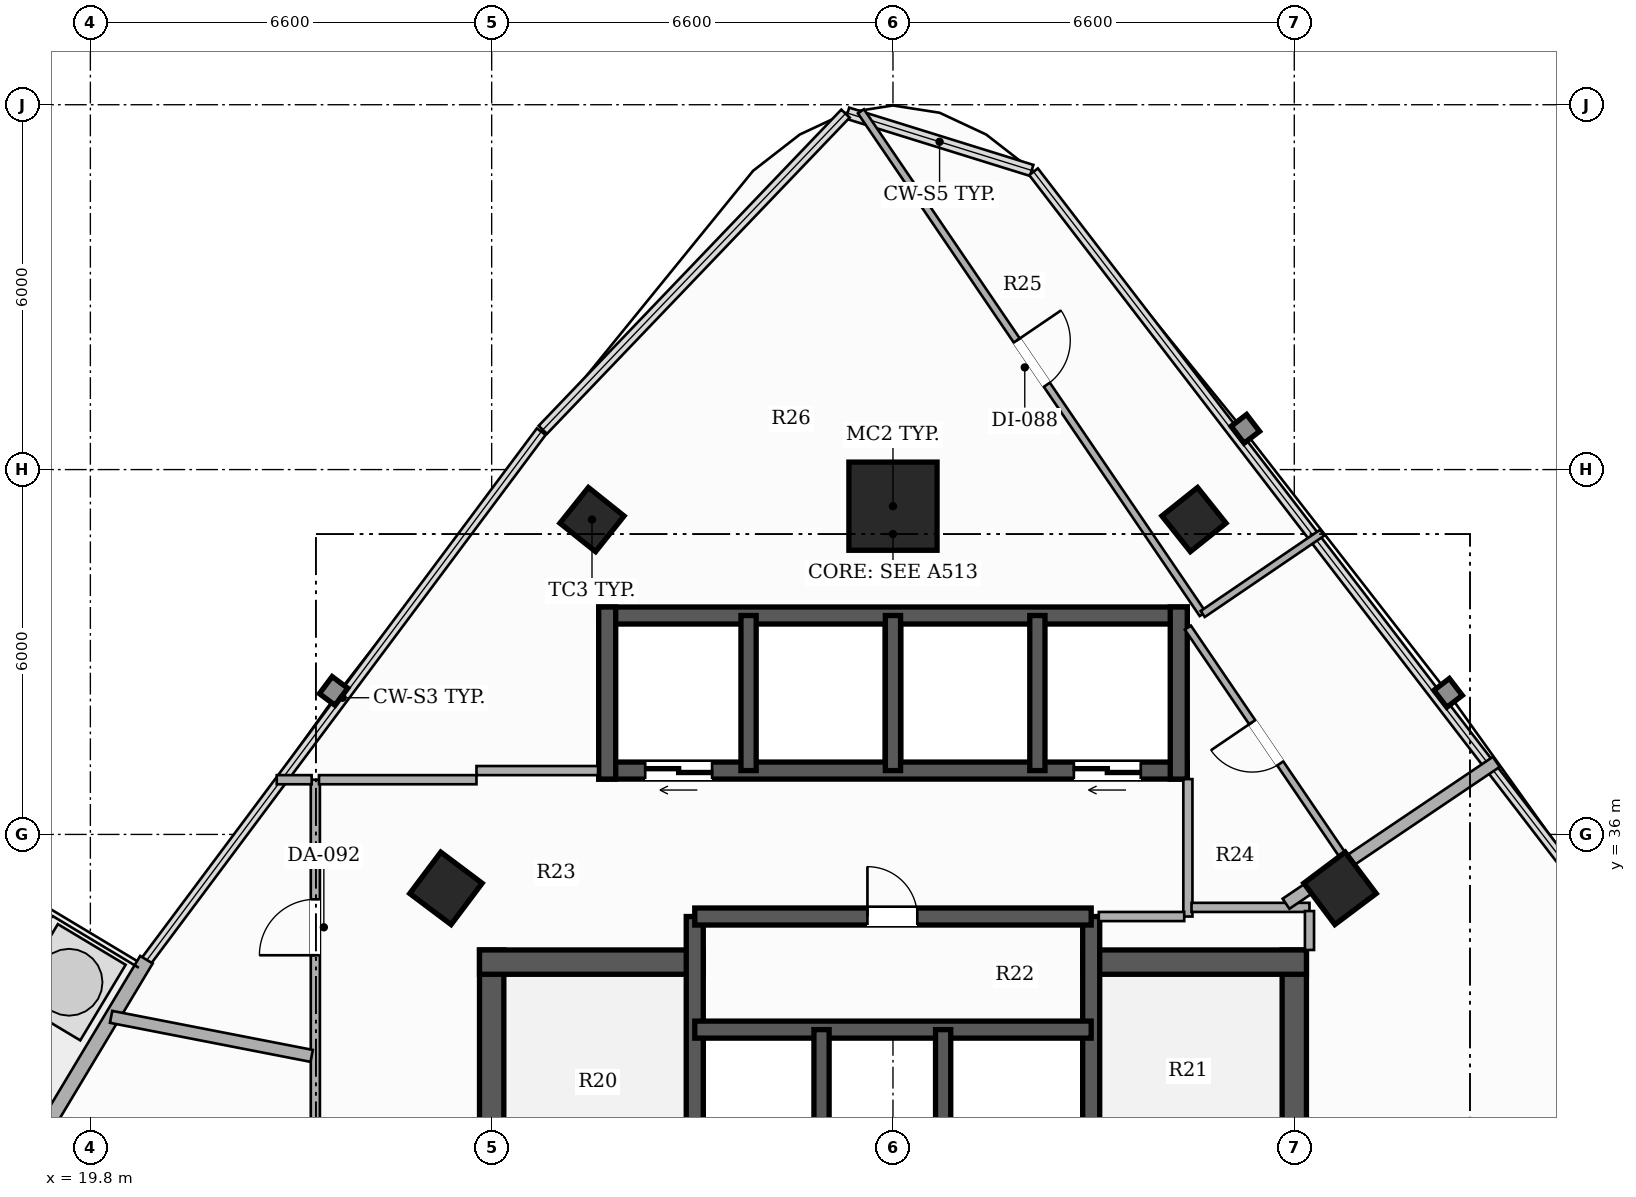
"""IFC4 building model, lengths in metres.
Left out: names, types, materials, properties, quantities, classifications, styles, units other than length and angle.
Written with IfcOpenShell. Run it as: python <this file> out.ifc"""

import sys

from ifc_helpers import new_model, si_unit, direction, frame, frame_2d, origin, origin_2d, place, context, subcontext, project, spatial, rectangle, hollow_rectangle, extrude, element, fill, save


model = new_model("IFC4")
c1 = context("Model", 3, precision=1e-05, world=origin(), true_north=direction((0.0, 1.0)))
c2 = subcontext(c1, "Body", "Model", "MODEL_VIEW")
j1 = project(units=[si_unit("LENGTHUNIT", "METRE"), si_unit("PLANEANGLEUNIT", "RADIAN")], contexts=[c1])
p1 = place(None, origin())
s1 = spatial("IfcSite", under=j1, at=p1, CompositionType="ELEMENT")
p2 = place(p1, origin())
s2 = spatial("IfcBuilding", under=s1, at=p2, CompositionType="ELEMENT")
p3 = place(p2, frame((0.0, 0.0, 167.15)))
s3 = spatial("IfcBuildingStorey", under=s2, at=p3, CompositionType="ELEMENT", Elevation=167.15)
p4 = place(p3, frame((26.4, 26.5, 0.0), z_axis=(0.0, 0.0, 1.0), x_axis=(0.0, 1.0, 0.0)))
e1 = element("IfcWall", 1, at=p4, inside=s3, PredefinedType="SHEAR", context=c2, shape_type="SweptSolid", body=[
    extrude(rectangle(XDim=7.6, YDim=0.4, at=frame_2d((3.8, 0.0))), origin(), (0.0, 0.0, 1.0), 3.3),
])
p5 = place(p3, frame((26.2, 33.9, 0.0), z_axis=(0.0, 0.0, 1.0), x_axis=(1.0, 0.0, 0.0)))
e2 = element("IfcWall", 2, at=p5, inside=s3, PredefinedType="SHEAR", context=c2, shape_type="SweptSolid", body=[
    extrude(rectangle(XDim=3.68, YDim=0.4, at=frame_2d((1.84, 0.0))), origin(), (0.0, 0.0, 1.0), 3.3),
])
p6 = place(p3, frame((39.6, 26.5, 0.0), z_axis=(0.0, 0.0, 1.0), x_axis=(0.0, 1.0, 0.0)))
e3 = element("IfcWall", 3, at=p6, inside=s3, PredefinedType="SHEAR", context=c2, shape_type="SweptSolid", body=[
    extrude(rectangle(XDim=7.6, YDim=0.4, at=frame_2d((3.8, 0.0))), origin(), (0.0, 0.0, 1.0), 3.3),
])
p7 = place(p3, frame((36.12, 33.9, 0.0), z_axis=(0.0, 0.0, 1.0), x_axis=(1.0, 0.0, 0.0)))
e4 = element("IfcWall", 4, at=p7, inside=s3, PredefinedType="SHEAR", context=c2, shape_type="SweptSolid", body=[
    extrude(rectangle(XDim=3.68, YDim=0.4, at=frame_2d((1.84, 0.0))), origin(), (0.0, 0.0, 1.0), 3.3),
])
p8 = place(p3, frame((29.74, 26.5, 0.0), z_axis=(0.0, 0.0, 1.0), x_axis=(0.0, 1.0, 0.0)))
e5 = element("IfcWall", 5, at=p8, inside=s3, PredefinedType="SHEAR", context=c2, shape_type="SweptSolid", body=[
    extrude(rectangle(XDim=8.15, YDim=0.28, at=frame_2d((4.075, 0.0))), origin(), (0.0, 0.0, 1.0), 3.3),
])
p9 = place(p8, frame((0.6, 0.0, 0.0)))
e6 = element("IfcOpeningElement", 6, at=p9, cuts=e5, PredefinedType="OPENING", context=c2, shape_type="SweptSolid", body=[
    extrude(rectangle(XDim=1.05, YDim=2.15, at=frame_2d((0.525, 1.075))), frame((0.0, 0.15, 0.0), z_axis=(0.0, -1.0, 0.0), x_axis=(1.0, 0.0, 0.0)), (0.0, 0.0, 1.0), 0.3),
])
p10 = place(p3, frame((36.26, 26.5, 0.0), z_axis=(0.0, 0.0, 1.0), x_axis=(0.0, 1.0, 0.0)))
e7 = element("IfcWall", 7, at=p10, inside=s3, PredefinedType="SHEAR", context=c2, shape_type="SweptSolid", body=[
    extrude(rectangle(XDim=8.15, YDim=0.28, at=frame_2d((4.075, 0.0))), origin(), (0.0, 0.0, 1.0), 3.3),
])
p11 = place(p10, frame((0.6, 0.0, 0.0)))
e8 = element("IfcOpeningElement", 8, at=p11, cuts=e7, PredefinedType="OPENING", context=c2, shape_type="SweptSolid", body=[
    extrude(rectangle(XDim=1.05, YDim=2.15, at=frame_2d((0.525, 1.075))), frame((0.0, 0.15, 0.0), z_axis=(0.0, -1.0, 0.0), x_axis=(1.0, 0.0, 0.0)), (0.0, 0.0, 1.0), 0.3),
])
p12 = place(p3, frame((29.74, 32.79, 0.0), z_axis=(0.0, 0.0, 1.0), x_axis=(1.0, 0.0, 0.0)))
e9 = element("IfcWall", 9, at=p12, inside=s3, PredefinedType="SHEAR", context=c2, shape_type="SweptSolid", body=[
    extrude(rectangle(XDim=6.52, YDim=0.28, at=frame_2d((3.26, 0.0))), origin(), (0.0, 0.0, 1.0), 3.3),
])
for number, where, z_axis, x_axis in (
    (10, (31.825, 29.89, 0.0), (0.0, 0.0, 1.0), (0.0, 1.0, 0.0)),
    (11, (33.825, 29.89, 0.0), (0.0, 0.0, 1.0), (0.0, 1.0, 0.0)),
):
    element("IfcWall", number, at=place(p3, frame(where, z_axis=z_axis, x_axis=x_axis)), inside=s3, PredefinedType="SHEAR", context=c2, shape_type="SweptSolid", body=[
        extrude(rectangle(XDim=2.9, YDim=0.25, at=frame_2d((1.45, 0.0))), origin(), (0.0, 0.0, 1.0), 3.3),
    ])
p13 = place(p3, frame((29.74, 34.65, 0.0), z_axis=(0.0, 0.0, 1.0), x_axis=(1.0, 0.0, 0.0)))
e12 = element("IfcWall", 12, at=p13, inside=s3, PredefinedType="SHEAR", context=c2, shape_type="SweptSolid", body=[
    extrude(rectangle(XDim=6.52, YDim=0.28, at=frame_2d((3.26, 0.0))), origin(), (0.0, 0.0, 1.0), 3.3),
])
p14 = place(p13, frame((2.84, 0.0, 0.0)))
e13 = element("IfcOpeningElement", 13, at=p14, cuts=e12, PredefinedType="OPENING", context=c2, shape_type="SweptSolid", body=[
    extrude(rectangle(XDim=0.82, YDim=2.1, at=frame_2d((0.41, 1.05))), frame((0.0, 0.15, 0.0), z_axis=(0.0, -1.0, 0.0), x_axis=(1.0, 0.0, 0.0)), (0.0, 0.0, 1.0), 0.3),
])
p15 = place(p3, frame((37.84, 37.05, 0.0), z_axis=(0.0, 0.0, 1.0), x_axis=(-1.0, 0.0, 0.0)))
e14 = element("IfcWall", 14, at=p15, inside=s3, PredefinedType="SHEAR", context=c2, shape_type="SweptSolid", body=[
    extrude(rectangle(XDim=9.68, YDim=0.28, at=frame_2d((4.84, 0.0))), origin(), (0.0, 0.0, 1.0), 3.3),
])
p16 = place(p15, frame((7.815, 0.0, 0.0)))
e15 = element("IfcOpeningElement", 15, at=p16, cuts=e14, PredefinedType="OPENING", context=c2, shape_type="SweptSolid", body=[
    extrude(rectangle(XDim=1.1, YDim=2.2, at=frame_2d((0.55, 1.1))), frame((0.0, 0.15, 0.0), z_axis=(0.0, -1.0, 0.0), x_axis=(1.0, 0.0, 0.0)), (0.0, 0.0, 1.0), 0.3),
])
p17 = place(p15, frame((0.765, 0.0, 0.0)))
e16 = element("IfcOpeningElement", 16, at=p17, cuts=e14, PredefinedType="OPENING", context=c2, shape_type="SweptSolid", body=[
    extrude(rectangle(XDim=1.1, YDim=2.2, at=frame_2d((0.55, 1.1))), frame((0.0, 0.15, 0.0), z_axis=(0.0, -1.0, 0.0), x_axis=(1.0, 0.0, 0.0)), (0.0, 0.0, 1.0), 0.3),
])
p18 = place(p3, frame((28.16, 39.6, 0.0), z_axis=(0.0, 0.0, 1.0), x_axis=(1.0, 0.0, 0.0)))
e17 = element("IfcWall", 17, at=p18, inside=s3, PredefinedType="SHEAR", context=c2, shape_type="SweptSolid", body=[
    extrude(rectangle(XDim=9.68, YDim=0.28, at=frame_2d((4.84, 0.0))), origin(), (0.0, 0.0, 1.0), 3.3),
])
for number, where, z_axis, x_axis in (
    (18, (28.3, 36.91, 0.0), (0.0, 0.0, 1.0), (0.0, 1.0, 0.0)),
    (19, (37.7, 36.91, 0.0), (0.0, 0.0, 1.0), (0.0, 1.0, 0.0)),
):
    element("IfcWall", number, at=place(p3, frame(where, z_axis=z_axis, x_axis=x_axis)), inside=s3, PredefinedType="SHEAR", context=c2, shape_type="SweptSolid", body=[
        extrude(rectangle(XDim=2.83, YDim=0.28, at=frame_2d((1.415, 0.0))), origin(), (0.0, 0.0, 1.0), 3.3),
    ])
for number, where, z_axis, x_axis in (
    (20, (30.625, 37.05, 0.0), (0.0, 0.0, 1.0), (0.0, 1.0, 0.0)),
    (21, (33.0, 37.05, 0.0), (0.0, 0.0, 1.0), (0.0, 1.0, 0.0)),
    (22, (35.375, 37.05, 0.0), (0.0, 0.0, 1.0), (0.0, 1.0, 0.0)),
):
    element("IfcWall", number, at=place(p3, frame(where, z_axis=z_axis, x_axis=x_axis)), inside=s3, PredefinedType="SHEAR", context=c2, shape_type="SweptSolid", body=[
        extrude(rectangle(XDim=2.55, YDim=0.25, at=frame_2d((1.275, 0.0))), origin(), (0.0, 0.0, 1.0), 3.3),
    ])
p19 = place(p3, frame((33.0, 41.398, 0.0), z_axis=(0.0, 0.0, 1.0), x_axis=(1.0, 0.0, 0.0)))
e23 = element("IfcColumn", 23, at=p19, inside=s3, PredefinedType="COLUMN", context=c2, shape_type="SweptSolid", body=[
    extrude(hollow_rectangle(XDim=1.45, YDim=1.45, WallThickness=0.045, at=origin_2d()), origin(), (0.0, 0.0, 1.0), 3.3),
])
for number, where, z_axis, x_axis in (
    (24, (25.648, 35.113, 0.0), (0.0, 0.0, 1.0), (0.6, 0.8, 0.0)),
    (25, (40.352, 35.113, 0.0), (0.0, 0.0, 1.0), (-0.6, 0.8, 0.0)),
):
    element("IfcColumn", number, at=place(p3, frame(where, z_axis=z_axis, x_axis=x_axis)), inside=s3, PredefinedType="COLUMN", context=c2, shape_type="SweptSolid", body=[
        extrude(hollow_rectangle(XDim=0.85, YDim=0.85, WallThickness=0.028, at=origin_2d()), origin(), (0.0, 0.0, 1.0), 3.3),
    ])
for number, where, z_axis, x_axis in (
    (26, (28.05, 41.178, 0.0), (0.0, 0.0, 1.0), (0.624, 0.782, 0.0)),
    (27, (37.95, 41.178, 0.0), (0.0, 0.0, 1.0), (-0.624, 0.782, 0.0)),
):
    element("IfcColumn", number, at=place(p3, frame(where, z_axis=z_axis, x_axis=x_axis)), inside=s3, PredefinedType="COLUMN", context=c2, shape_type="SweptSolid", body=[
        extrude(hollow_rectangle(XDim=0.75, YDim=0.75, WallThickness=0.025, at=origin_2d()), origin(), (0.0, 0.0, 1.0), 3.3),
    ])
p20 = place(p3, frame((20.722, 33.94, 0.0), z_axis=(0.0, 0.0, 1.0), x_axis=(-0.514334017412, -0.85758994778, 0.0)))
e28 = element("IfcWall", 28, at=p20, inside=s3, PredefinedType="SOLIDWALL", context=c2, shape_type="SweptSolid", body=[
    extrude(rectangle(XDim=11.1, YDim=0.24, at=frame_2d((5.55, 0.0))), origin(), (0.0, 0.0, 1.0), 2.624),
])
p21 = place(p20, frame((8.602, 0.0, 0.0)))
e29 = element("IfcOpeningElement", 29, at=p21, cuts=e28, PredefinedType="OPENING", context=c2, shape_type="SweptSolid", body=[
    extrude(rectangle(XDim=1.8, YDim=2.2, at=frame_2d((0.9, 1.1))), frame((0.0, 0.13, 0.0), z_axis=(0.0, -1.0, 0.0), x_axis=(1.0, 0.0, 0.0)), (0.0, 0.0, 1.0), 0.26),
])
p22 = place(p3, frame((37.85, 34.65, 0.0), z_axis=(0.0, 0.0, 1.0), x_axis=(0.0, 1.0, 0.0)))
e30 = element("IfcWall", 30, at=p22, inside=s3, PredefinedType="PARTITIONING", context=c2, shape_type="SweptSolid", body=[
    extrude(rectangle(XDim=2.26, YDim=0.15, at=frame_2d((1.13, 0.0))), origin(), (0.0, 0.0, 1.0), 3.06),
])
p23 = place(p3, frame((36.385, 34.65, 0.0), z_axis=(0.0, 0.0, 1.0), x_axis=(1.0, 0.0, 0.0)))
e31 = element("IfcWall", 31, at=p23, inside=s3, PredefinedType="PARTITIONING", context=c2, shape_type="SweptSolid", body=[
    extrude(rectangle(XDim=1.405, YDim=0.15, at=frame_2d((0.703, 0.0))), origin(), (0.0, 0.0, 1.0), 2.425),
])
p24 = place(p3, frame((23.5, 14.06, 0.0), z_axis=(0.0, 0.0, 1.0), x_axis=(0.0, 1.0, 0.0)))
e32 = element("IfcWall", 32, at=p24, inside=s3, PredefinedType="PARTITIONING", context=c2, shape_type="SweptSolid", body=[
    extrude(rectangle(XDim=22.84, YDim=0.15, at=frame_2d((11.42, 0.0))), origin(), (0.0, 0.0, 1.0), 2.413),
])
p25 = place(p24, frame((4.064, 0.0, 0.0)))
e33 = element("IfcOpeningElement", 33, at=p25, cuts=e32, PredefinedType="OPENING", context=c2, shape_type="SweptSolid", body=[
    extrude(rectangle(XDim=0.92, YDim=2.15, at=frame_2d((0.46, 1.075))), frame((0.0, 0.085, 0.0), z_axis=(0.0, -1.0, 0.0), x_axis=(1.0, 0.0, 0.0)), (0.0, 0.0, 1.0), 0.17),
])
p26 = place(p24, frame((13.047, 0.0, 0.0)))
e34 = element("IfcOpeningElement", 34, at=p26, cuts=e32, PredefinedType="OPENING", context=c2, shape_type="SweptSolid", body=[
    extrude(rectangle(XDim=0.88, YDim=2.1, at=frame_2d((0.44, 1.05))), frame((0.0, 0.085, 0.0), z_axis=(0.0, -1.0, 0.0), x_axis=(1.0, 0.0, 0.0)), (0.0, 0.0, 1.0), 0.17),
])
p27 = place(p24, frame((19.953, 0.0, 0.0)))
e35 = element("IfcOpeningElement", 35, at=p27, cuts=e32, PredefinedType="OPENING", context=c2, shape_type="SweptSolid", body=[
    extrude(rectangle(XDim=0.92, YDim=2.15, at=frame_2d((0.46, 1.075))), frame((0.0, 0.085, 0.0), z_axis=(0.0, -1.0, 0.0), x_axis=(1.0, 0.0, 0.0)), (0.0, 0.0, 1.0), 0.17),
])
p28 = place(p3, frame((22.865, 36.9, 0.0), z_axis=(0.0, 0.0, 1.0), x_axis=(1.0, 0.0, 0.0)))
e36 = element("IfcWall", 36, at=p28, inside=s3, PredefinedType="PARTITIONING", context=c2, shape_type="SweptSolid", body=[
    extrude(rectangle(XDim=0.575, YDim=0.15, at=frame_2d((0.288, 0.0))), origin(), (0.0, 0.0, 1.0), 3.06),
])
p29 = place(p3, frame((23.56, 36.9, 0.0), z_axis=(0.0, 0.0, 1.0), x_axis=(1.0, 0.0, 0.0)))
e37 = element("IfcWall", 37, at=p29, inside=s3, PredefinedType="PARTITIONING", context=c2, shape_type="SweptSolid", body=[
    extrude(rectangle(XDim=2.59, YDim=0.15, at=frame_2d((1.295, 0.0))), origin(), (0.0, 0.0, 1.0), 2.413),
])
p30 = place(p3, frame((26.15, 37.05, 0.0), z_axis=(0.0, 0.0, 1.0), x_axis=(1.0, 0.0, 0.0)))
e38 = element("IfcWall", 38, at=p30, inside=s3, PredefinedType="PARTITIONING", context=c2, shape_type="SweptSolid", body=[
    extrude(rectangle(XDim=2.0, YDim=0.15, at=frame_2d((1.0, 0.0))), origin(), (0.0, 0.0, 1.0), 2.413),
])
p31 = place(p3, frame((37.91, 34.8, 0.0), z_axis=(0.0, 0.0, 1.0), x_axis=(1.0, 0.0, 0.0)))
e39 = element("IfcWall", 39, at=p31, inside=s3, PredefinedType="PARTITIONING", context=c2, shape_type="SweptSolid", body=[
    extrude(rectangle(XDim=1.94, YDim=0.15, at=frame_2d((0.97, 0.0))), origin(), (0.0, 0.0, 1.0), 2.721),
])
p32 = place(p3, frame((39.85, 34.74, 0.0), z_axis=(0.0, 0.0, 1.0), x_axis=(0.0, -1.0, 0.0)))
e40 = element("IfcWall", 40, at=p32, inside=s3, PredefinedType="PARTITIONING", context=c2, shape_type="SweptSolid", body=[
    extrude(rectangle(XDim=0.64, YDim=0.15, at=frame_2d((0.32, 0.0))), origin(), (0.0, 0.0, 1.0), 2.721),
])
p33 = place(p3, frame((39.464, 34.86, 0.0), z_axis=(0.0, 0.0, 1.0), x_axis=(0.828976210701, 0.559283865395, 0.0)))
e41 = element("IfcWall", 41, at=p33, inside=s3, PredefinedType="PARTITIONING", context=c2, shape_type="SweptSolid", body=[
    extrude(rectangle(XDim=4.171, YDim=0.2, at=frame_2d((2.086, 0.0))), origin(), (0.0, 0.0, 1.0), 2.413),
])
p34 = place(p3, frame((20.141, 33.0, 0.0), z_axis=(0.0, 0.0, 1.0), x_axis=(0.981579076432, -0.191056318163, 0.0)))
e42 = element("IfcWall", 42, at=p34, inside=s3, PredefinedType="PARTITIONING", context=c2, shape_type="SweptSolid", body=[
    extrude(rectangle(XDim=3.361, YDim=0.2, at=frame_2d((1.68, 0.0))), origin(), (0.0, 0.0, 1.0), 2.413),
])
p35 = place(p3, frame((40.427, 35.612, 0.0), z_axis=(0.0, 0.0, 1.0), x_axis=(-0.562385802303, 0.826874965982, 0.0)))
e43 = element("IfcWall", 43, at=p35, inside=s3, PredefinedType="PARTITIONING", context=c2, shape_type="SweptSolid", body=[
    extrude(rectangle(XDim=4.582, YDim=0.12, at=frame_2d((2.291, 0.0))), origin(), (0.0, 0.0, 1.0), 2.413),
])
p36 = place(p35, frame((1.881, 0.0, 0.0)))
e44 = element("IfcOpeningElement", 44, at=p36, cuts=e43, PredefinedType="OPENING", context=c2, shape_type="SweptSolid", body=[
    extrude(rectangle(XDim=0.82, YDim=2.1, at=frame_2d((0.41, 1.05))), frame((0.0, 0.07, 0.0), z_axis=(0.0, -1.0, 0.0), x_axis=(1.0, 0.0, 0.0)), (0.0, 0.0, 1.0), 0.14),
])
p37 = place(p3, frame((32.473, 47.892, 0.0), z_axis=(0.0, 0.0, 1.0), x_axis=(0.562273950157, -0.826951029369, 0.0)))
e45 = element("IfcWall", 45, at=p37, inside=s3, PredefinedType="PARTITIONING", context=c2, shape_type="SweptSolid", body=[
    extrude(rectangle(XDim=9.997, YDim=0.12, at=frame_2d((4.999, 0.0))), origin(), (0.0, 0.0, 1.0), 2.413),
])
p38 = place(p37, frame((4.558, 0.0, 0.0)))
e46 = element("IfcOpeningElement", 46, at=p38, cuts=e45, PredefinedType="OPENING", context=c2, shape_type="SweptSolid", body=[
    extrude(rectangle(XDim=0.88, YDim=2.1, at=frame_2d((0.44, 1.05))), frame((0.0, 0.07, 0.0), z_axis=(0.0, -1.0, 0.0), x_axis=(1.0, 0.0, 0.0)), (0.0, 0.0, 1.0), 0.14),
])
p39 = place(p3, frame((38.094, 39.625, 0.0), z_axis=(0.0, 0.0, 1.0), x_axis=(0.826798473187, 0.562498253096, 0.0)))
e47 = element("IfcWall", 47, at=p39, inside=s3, PredefinedType="PARTITIONING", context=c2, shape_type="SweptSolid", body=[
    extrude(rectangle(XDim=2.377, YDim=0.12, at=frame_2d((1.188, 0.0))), origin(), (0.0, 0.0, 1.0), 2.413),
])
p40 = place(p16, origin())
e48 = element("IfcDoor", 48, at=p40, inside=s3, OperationType="DOUBLE_DOOR_SLIDING", PredefinedType="DOOR", context=c2, shape_type="SweptSolid", body=[
    extrude(rectangle(XDim=1.1, YDim=2.2, at=frame_2d((0.55, 1.1))), frame((0.0, 0.025, 0.0), z_axis=(0.0, -1.0, 0.0), x_axis=(1.0, 0.0, 0.0)), (0.0, 0.0, 1.0), 0.05),
])
fill(e15, e48)
p41 = place(p17, origin())
e49 = element("IfcDoor", 49, at=p41, inside=s3, OperationType="DOUBLE_DOOR_SLIDING", PredefinedType="DOOR", context=c2, shape_type="SweptSolid", body=[
    extrude(rectangle(XDim=1.1, YDim=2.2, at=frame_2d((0.55, 1.1))), frame((0.0, 0.025, 0.0), z_axis=(0.0, -1.0, 0.0), x_axis=(1.0, 0.0, 0.0)), (0.0, 0.0, 1.0), 0.05),
])
fill(e16, e49)
p42 = place(p14, origin())
e50 = element("IfcDoor", 50, at=p42, inside=s3, OperationType="SINGLE_SWING_LEFT", PredefinedType="DOOR", context=c2, shape_type="SweptSolid", body=[
    extrude(rectangle(XDim=0.82, YDim=2.1, at=frame_2d((0.41, 1.05))), frame((0.0, 0.025, 0.0), z_axis=(0.0, -1.0, 0.0), x_axis=(1.0, 0.0, 0.0)), (0.0, 0.0, 1.0), 0.05),
])
fill(e13, e50)
p43 = place(p27, origin())
e51 = element("IfcDoor", 51, at=p43, inside=s3, OperationType="SINGLE_SWING_LEFT", PredefinedType="DOOR", context=c2, shape_type="SweptSolid", body=[
    extrude(rectangle(XDim=0.92, YDim=2.15, at=frame_2d((0.46, 1.075))), frame((0.0, 0.025, 0.0), z_axis=(0.0, -1.0, 0.0), x_axis=(1.0, 0.0, 0.0)), (0.0, 0.0, 1.0), 0.05),
])
fill(e35, e51)
p44 = place(p36, origin())
e52 = element("IfcDoor", 52, at=p44, inside=s3, OperationType="SINGLE_SWING_RIGHT", PredefinedType="DOOR", context=c2, shape_type="SweptSolid", body=[
    extrude(rectangle(XDim=0.82, YDim=2.1, at=frame_2d((0.41, 1.05))), frame((0.0, 0.025, 0.0), z_axis=(0.0, -1.0, 0.0), x_axis=(1.0, 0.0, 0.0)), (0.0, 0.0, 1.0), 0.05),
])
fill(e44, e52)
p45 = place(p38, origin())
e53 = element("IfcDoor", 53, at=p45, inside=s3, OperationType="SINGLE_SWING_LEFT", PredefinedType="DOOR", context=c2, shape_type="SweptSolid", body=[
    extrude(rectangle(XDim=0.88, YDim=2.1, at=frame_2d((0.44, 1.05))), frame((0.0, 0.025, 0.0), z_axis=(0.0, -1.0, 0.0), x_axis=(1.0, 0.0, 0.0)), (0.0, 0.0, 1.0), 0.05),
])
fill(e46, e53)
save(model, sys.argv[1])
